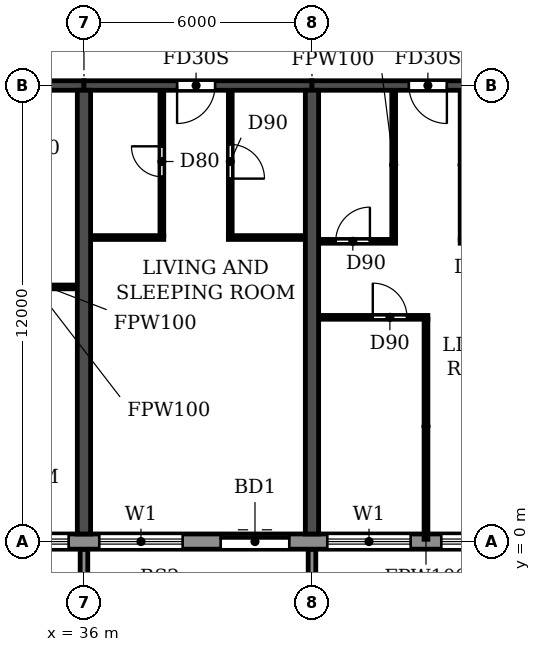
"""IFC4 building model, lengths in metres.
Left out: names, types, materials, properties, quantities, classifications, styles, units other than length and angle.
Written with IfcOpenShell. Run it as: python <this file> out.ifc"""

import sys

from ifc_helpers import new_model, si_unit, direction, frame, frame_2d, origin, place, context, subcontext, project, spatial, polyline, rectangle, outline, extrude, source, transform, mapped, element, fill, save


model = new_model("IFC4")
c1 = context("Model", 3, precision=1e-05, world=origin(), true_north=direction((0.0, 1.0)))
c2 = subcontext(c1, "Body", "Model", "MODEL_VIEW")
j1 = project(units=[si_unit("LENGTHUNIT", "METRE"), si_unit("PLANEANGLEUNIT", "RADIAN")], contexts=[c1])
p1 = place(None, origin())
s1 = spatial("IfcSite", under=j1, at=p1, CompositionType="ELEMENT")
p2 = place(p1, origin())
s2 = spatial("IfcBuilding", under=s1, at=p2, CompositionType="ELEMENT")
p3 = place(p2, frame((0.0, 0.0, 102.6)))
s3 = spatial("IfcBuildingStorey", under=s2, at=p3, CompositionType="ELEMENT", Elevation=102.6)
for number, where, z_axis, x_axis in (
    (1, (36.0, 0.2, 0.0), (0.0, 0.0, 1.0), (0.0, 1.0, 0.0)),
    (2, (42.0, 0.2, 0.0), (0.0, 0.0, 1.0), (0.0, 1.0, 0.0)),
):
    element("IfcWall", number, at=place(p3, frame(where, z_axis=z_axis, x_axis=x_axis)), inside=s3, PredefinedType="SHEAR", context=c2, shape_type="SweptSolid", body=[
        extrude(rectangle(XDim=11.675, YDim=0.35, at=frame_2d((5.837, 0.0))), origin(), (0.0, 0.0, 1.0), 3.0),
    ])
p4 = place(p3, frame((30.0, 12.0, 0.0), z_axis=(0.0, 0.0, 1.0), x_axis=(1.0, 0.0, 0.0)))
e3 = element("IfcWall", 3, at=p4, inside=s3, PredefinedType="SHEAR", context=c2, shape_type="SweptSolid", body=[
    extrude(rectangle(XDim=6.0, YDim=0.25, at=frame_2d((3.0, 0.0))), origin(), (0.0, 0.0, 1.0), 2.4),
])
p5 = place(p4, frame((2.45, 0.0, 0.0)))
e4 = element("IfcOpeningElement", 4, at=p5, cuts=e3, PredefinedType="OPENING", context=c2, shape_type="SweptSolid", body=[
    extrude(rectangle(XDim=1.0, YDim=2.1, at=frame_2d((0.5, 1.05))), frame((0.0, 0.135, 0.0), z_axis=(0.0, -1.0, 0.0), x_axis=(1.0, 0.0, 0.0)), (0.0, 0.0, 1.0), 0.27),
])
p6 = place(p3, frame((36.0, 12.0, 0.0), z_axis=(0.0, 0.0, 1.0), x_axis=(1.0, 0.0, 0.0)))
e5 = element("IfcWall", 5, at=p6, inside=s3, PredefinedType="SHEAR", context=c2, shape_type="SweptSolid", body=[
    extrude(rectangle(XDim=6.0, YDim=0.25, at=frame_2d((3.0, 0.0))), origin(), (0.0, 0.0, 1.0), 2.4),
])
p7 = place(p6, frame((2.45, 0.0, 0.0)))
e6 = element("IfcOpeningElement", 6, at=p7, cuts=e5, PredefinedType="OPENING", context=c2, shape_type="SweptSolid", body=[
    extrude(rectangle(XDim=1.0, YDim=2.1, at=frame_2d((0.5, 1.05))), frame((0.0, 0.135, 0.0), z_axis=(0.0, -1.0, 0.0), x_axis=(1.0, 0.0, 0.0)), (0.0, 0.0, 1.0), 0.27),
])
p8 = place(p3, frame((42.0, 12.0, 0.0), z_axis=(0.0, 0.0, 1.0), x_axis=(1.0, 0.0, 0.0)))
e7 = element("IfcWall", 7, at=p8, inside=s3, PredefinedType="SHEAR", context=c2, shape_type="SweptSolid", body=[
    extrude(rectangle(XDim=6.0, YDim=0.25, at=frame_2d((3.0, 0.0))), origin(), (0.0, 0.0, 1.0), 2.4),
])
p9 = place(p8, frame((2.55, 0.0, 0.0)))
e8 = element("IfcOpeningElement", 8, at=p9, cuts=e7, PredefinedType="OPENING", context=c2, shape_type="SweptSolid", body=[
    extrude(rectangle(XDim=1.0, YDim=2.1, at=frame_2d((0.5, 1.05))), frame((0.0, 0.135, 0.0), z_axis=(0.0, -1.0, 0.0), x_axis=(1.0, 0.0, 0.0)), (0.0, 0.0, 1.0), 0.27),
])
p10 = place(p3, frame((10.683, 0.0, 0.0), z_axis=(0.0, 0.0, 1.0), x_axis=(1.0, 0.0, 0.0)))
e9 = element("IfcWall", 9, at=p10, inside=s3, PredefinedType="STANDARD", context=c2, shape_type="SweptSolid", body=[
    extrude(rectangle(XDim=80.634, YDim=0.4, at=frame_2d((40.317, 0.0))), origin(), (0.0, 0.0, 1.0), 3.0),
])
p11 = place(p10, frame((1.717, 0.0, 0.9)))
e10 = element("IfcOpeningElement", 10, at=p11, cuts=e9, PredefinedType="OPENING", context=c2, shape_type="SweptSolid", body=[
    extrude(rectangle(XDim=2.2, YDim=1.5, at=frame_2d((1.1, 0.75))), frame((0.0, 0.21, 0.0), z_axis=(0.0, -1.0, 0.0), x_axis=(1.0, 0.0, 0.0)), (0.0, 0.0, 1.0), 0.42),
])
p12 = place(p10, frame((4.917, 0.0, 0.0)))
e11 = element("IfcOpeningElement", 11, at=p12, cuts=e9, PredefinedType="OPENING", context=c2, shape_type="SweptSolid", body=[
    extrude(rectangle(XDim=1.8, YDim=2.4, at=frame_2d((0.9, 1.2))), frame((0.0, 0.21, 0.0), z_axis=(0.0, -1.0, 0.0), x_axis=(1.0, 0.0, 0.0)), (0.0, 0.0, 1.0), 0.42),
])
p13 = place(p10, frame((7.717, 0.0, 0.9)))
e12 = element("IfcOpeningElement", 12, at=p13, cuts=e9, PredefinedType="OPENING", context=c2, shape_type="SweptSolid", body=[
    extrude(rectangle(XDim=2.2, YDim=1.5, at=frame_2d((1.1, 0.75))), frame((0.0, 0.21, 0.0), z_axis=(0.0, -1.0, 0.0), x_axis=(1.0, 0.0, 0.0)), (0.0, 0.0, 1.0), 0.42),
])
p14 = place(p10, frame((10.717, 0.0, 0.9)))
e13 = element("IfcOpeningElement", 13, at=p14, cuts=e9, PredefinedType="OPENING", context=c2, shape_type="SweptSolid", body=[
    extrude(rectangle(XDim=2.2, YDim=1.5, at=frame_2d((1.1, 0.75))), frame((0.0, 0.21, 0.0), z_axis=(0.0, -1.0, 0.0), x_axis=(1.0, 0.0, 0.0)), (0.0, 0.0, 1.0), 0.42),
])
p15 = place(p10, frame((13.717, 0.0, 0.9)))
e14 = element("IfcOpeningElement", 14, at=p15, cuts=e9, PredefinedType="OPENING", context=c2, shape_type="SweptSolid", body=[
    extrude(rectangle(XDim=2.2, YDim=1.5, at=frame_2d((1.1, 0.75))), frame((0.0, 0.21, 0.0), z_axis=(0.0, -1.0, 0.0), x_axis=(1.0, 0.0, 0.0)), (0.0, 0.0, 1.0), 0.42),
])
p16 = place(p10, frame((16.717, 0.0, 0.9)))
e15 = element("IfcOpeningElement", 15, at=p16, cuts=e9, PredefinedType="OPENING", context=c2, shape_type="SweptSolid", body=[
    extrude(rectangle(XDim=2.2, YDim=1.5, at=frame_2d((1.1, 0.75))), frame((0.0, 0.21, 0.0), z_axis=(0.0, -1.0, 0.0), x_axis=(1.0, 0.0, 0.0)), (0.0, 0.0, 1.0), 0.42),
])
p17 = place(p10, frame((19.717, 0.0, 0.9)))
e16 = element("IfcOpeningElement", 16, at=p17, cuts=e9, PredefinedType="OPENING", context=c2, shape_type="SweptSolid", body=[
    extrude(rectangle(XDim=2.2, YDim=1.5, at=frame_2d((1.1, 0.75))), frame((0.0, 0.21, 0.0), z_axis=(0.0, -1.0, 0.0), x_axis=(1.0, 0.0, 0.0)), (0.0, 0.0, 1.0), 0.42),
])
p18 = place(p10, frame((22.717, 0.0, 0.9)))
e17 = element("IfcOpeningElement", 17, at=p18, cuts=e9, PredefinedType="OPENING", context=c2, shape_type="SweptSolid", body=[
    extrude(rectangle(XDim=2.2, YDim=1.5, at=frame_2d((1.1, 0.75))), frame((0.0, 0.21, 0.0), z_axis=(0.0, -1.0, 0.0), x_axis=(1.0, 0.0, 0.0)), (0.0, 0.0, 1.0), 0.42),
])
p19 = place(p10, frame((25.717, 0.0, 0.9)))
e18 = element("IfcOpeningElement", 18, at=p19, cuts=e9, PredefinedType="OPENING", context=c2, shape_type="SweptSolid", body=[
    extrude(rectangle(XDim=2.2, YDim=1.5, at=frame_2d((1.1, 0.75))), frame((0.0, 0.21, 0.0), z_axis=(0.0, -1.0, 0.0), x_axis=(1.0, 0.0, 0.0)), (0.0, 0.0, 1.0), 0.42),
])
p20 = place(p10, frame((28.917, 0.0, 0.0)))
e19 = element("IfcOpeningElement", 19, at=p20, cuts=e9, PredefinedType="OPENING", context=c2, shape_type="SweptSolid", body=[
    extrude(rectangle(XDim=1.8, YDim=2.4, at=frame_2d((0.9, 1.2))), frame((0.0, 0.21, 0.0), z_axis=(0.0, -1.0, 0.0), x_axis=(1.0, 0.0, 0.0)), (0.0, 0.0, 1.0), 0.42),
])
p21 = place(p10, frame((31.717, 0.0, 0.9)))
e20 = element("IfcOpeningElement", 20, at=p21, cuts=e9, PredefinedType="OPENING", context=c2, shape_type="SweptSolid", body=[
    extrude(rectangle(XDim=2.2, YDim=1.5, at=frame_2d((1.1, 0.75))), frame((0.0, 0.21, 0.0), z_axis=(0.0, -1.0, 0.0), x_axis=(1.0, 0.0, 0.0)), (0.0, 0.0, 1.0), 0.42),
])
p22 = place(p10, frame((34.717, 0.0, 0.9)))
e21 = element("IfcOpeningElement", 21, at=p22, cuts=e9, PredefinedType="OPENING", context=c2, shape_type="SweptSolid", body=[
    extrude(rectangle(XDim=2.2, YDim=1.5, at=frame_2d((1.1, 0.75))), frame((0.0, 0.21, 0.0), z_axis=(0.0, -1.0, 0.0), x_axis=(1.0, 0.0, 0.0)), (0.0, 0.0, 1.0), 0.42),
])
p23 = place(p10, frame((37.717, 0.0, 0.9)))
e22 = element("IfcOpeningElement", 22, at=p23, cuts=e9, PredefinedType="OPENING", context=c2, shape_type="SweptSolid", body=[
    extrude(rectangle(XDim=2.2, YDim=1.5, at=frame_2d((1.1, 0.75))), frame((0.0, 0.21, 0.0), z_axis=(0.0, -1.0, 0.0), x_axis=(1.0, 0.0, 0.0)), (0.0, 0.0, 1.0), 0.42),
])
p24 = place(p10, frame((40.717, 0.0, 0.9)))
e23 = element("IfcOpeningElement", 23, at=p24, cuts=e9, PredefinedType="OPENING", context=c2, shape_type="SweptSolid", body=[
    extrude(rectangle(XDim=2.2, YDim=1.5, at=frame_2d((1.1, 0.75))), frame((0.0, 0.21, 0.0), z_axis=(0.0, -1.0, 0.0), x_axis=(1.0, 0.0, 0.0)), (0.0, 0.0, 1.0), 0.42),
])
p25 = place(p10, frame((43.717, 0.0, 0.9)))
e24 = element("IfcOpeningElement", 24, at=p25, cuts=e9, PredefinedType="OPENING", context=c2, shape_type="SweptSolid", body=[
    extrude(rectangle(XDim=2.2, YDim=1.5, at=frame_2d((1.1, 0.75))), frame((0.0, 0.21, 0.0), z_axis=(0.0, -1.0, 0.0), x_axis=(1.0, 0.0, 0.0)), (0.0, 0.0, 1.0), 0.42),
])
p26 = place(p10, frame((46.717, 0.0, 0.9)))
e25 = element("IfcOpeningElement", 25, at=p26, cuts=e9, PredefinedType="OPENING", context=c2, shape_type="SweptSolid", body=[
    extrude(rectangle(XDim=2.2, YDim=1.5, at=frame_2d((1.1, 0.75))), frame((0.0, 0.21, 0.0), z_axis=(0.0, -1.0, 0.0), x_axis=(1.0, 0.0, 0.0)), (0.0, 0.0, 1.0), 0.42),
])
p27 = place(p10, frame((49.917, 0.0, 0.0)))
e26 = element("IfcOpeningElement", 26, at=p27, cuts=e9, PredefinedType="OPENING", context=c2, shape_type="SweptSolid", body=[
    extrude(rectangle(XDim=1.8, YDim=2.4, at=frame_2d((0.9, 1.2))), frame((0.0, 0.21, 0.0), z_axis=(0.0, -1.0, 0.0), x_axis=(1.0, 0.0, 0.0)), (0.0, 0.0, 1.0), 0.42),
])
p28 = place(p10, frame((52.717, 0.0, 0.9)))
e27 = element("IfcOpeningElement", 27, at=p28, cuts=e9, PredefinedType="OPENING", context=c2, shape_type="SweptSolid", body=[
    extrude(rectangle(XDim=2.2, YDim=1.5, at=frame_2d((1.1, 0.75))), frame((0.0, 0.21, 0.0), z_axis=(0.0, -1.0, 0.0), x_axis=(1.0, 0.0, 0.0)), (0.0, 0.0, 1.0), 0.42),
])
p29 = place(p10, frame((55.717, 0.0, 0.9)))
e28 = element("IfcOpeningElement", 28, at=p29, cuts=e9, PredefinedType="OPENING", context=c2, shape_type="SweptSolid", body=[
    extrude(rectangle(XDim=2.2, YDim=1.5, at=frame_2d((1.1, 0.75))), frame((0.0, 0.21, 0.0), z_axis=(0.0, -1.0, 0.0), x_axis=(1.0, 0.0, 0.0)), (0.0, 0.0, 1.0), 0.42),
])
p30 = place(p10, frame((58.717, 0.0, 0.9)))
e29 = element("IfcOpeningElement", 29, at=p30, cuts=e9, PredefinedType="OPENING", context=c2, shape_type="SweptSolid", body=[
    extrude(rectangle(XDim=2.2, YDim=1.5, at=frame_2d((1.1, 0.75))), frame((0.0, 0.21, 0.0), z_axis=(0.0, -1.0, 0.0), x_axis=(1.0, 0.0, 0.0)), (0.0, 0.0, 1.0), 0.42),
])
p31 = place(p10, frame((61.717, 0.0, 0.9)))
e30 = element("IfcOpeningElement", 30, at=p31, cuts=e9, PredefinedType="OPENING", context=c2, shape_type="SweptSolid", body=[
    extrude(rectangle(XDim=2.2, YDim=1.5, at=frame_2d((1.1, 0.75))), frame((0.0, 0.21, 0.0), z_axis=(0.0, -1.0, 0.0), x_axis=(1.0, 0.0, 0.0)), (0.0, 0.0, 1.0), 0.42),
])
p32 = place(p10, frame((64.717, 0.0, 0.9)))
e31 = element("IfcOpeningElement", 31, at=p32, cuts=e9, PredefinedType="OPENING", context=c2, shape_type="SweptSolid", body=[
    extrude(rectangle(XDim=2.2, YDim=1.5, at=frame_2d((1.1, 0.75))), frame((0.0, 0.21, 0.0), z_axis=(0.0, -1.0, 0.0), x_axis=(1.0, 0.0, 0.0)), (0.0, 0.0, 1.0), 0.42),
])
p33 = place(p10, frame((67.717, 0.0, 0.9)))
e32 = element("IfcOpeningElement", 32, at=p33, cuts=e9, PredefinedType="OPENING", context=c2, shape_type="SweptSolid", body=[
    extrude(rectangle(XDim=2.2, YDim=1.5, at=frame_2d((1.1, 0.75))), frame((0.0, 0.21, 0.0), z_axis=(0.0, -1.0, 0.0), x_axis=(1.0, 0.0, 0.0)), (0.0, 0.0, 1.0), 0.42),
])
p34 = place(p10, frame((70.717, 0.0, 0.9)))
e33 = element("IfcOpeningElement", 33, at=p34, cuts=e9, PredefinedType="OPENING", context=c2, shape_type="SweptSolid", body=[
    extrude(rectangle(XDim=2.2, YDim=1.5, at=frame_2d((1.1, 0.75))), frame((0.0, 0.21, 0.0), z_axis=(0.0, -1.0, 0.0), x_axis=(1.0, 0.0, 0.0)), (0.0, 0.0, 1.0), 0.42),
])
p35 = place(p10, frame((73.717, 0.0, 0.9)))
e34 = element("IfcOpeningElement", 34, at=p35, cuts=e9, PredefinedType="OPENING", context=c2, shape_type="SweptSolid", body=[
    extrude(rectangle(XDim=2.2, YDim=1.5, at=frame_2d((1.1, 0.75))), frame((0.0, 0.21, 0.0), z_axis=(0.0, -1.0, 0.0), x_axis=(1.0, 0.0, 0.0)), (0.0, 0.0, 1.0), 0.42),
])
p36 = place(p10, frame((76.917, 0.0, 0.0)))
e35 = element("IfcOpeningElement", 35, at=p36, cuts=e9, PredefinedType="OPENING", context=c2, shape_type="SweptSolid", body=[
    extrude(rectangle(XDim=1.8, YDim=2.4, at=frame_2d((0.9, 1.2))), frame((0.0, 0.21, 0.0), z_axis=(0.0, -1.0, 0.0), x_axis=(1.0, 0.0, 0.0)), (0.0, 0.0, 1.0), 0.42),
])
m1 = source(origin(), c2, "Body", "SweptSolid", [
    extrude(outline(polyline([(0.0, 0.0), (0.2, 0.0), (0.2, 1.65), (0.0, 1.65), (0.0, 0.0)])), origin(), (0.0, 0.0, 1.0), 3.1),
])
for number, where in (
    (36, (35.9, -1.85, 0.0)),
    (37, (41.9, -1.85, 0.0)),
):
    element("IfcWall", number, at=place(p3, frame(where)), inside=s3, PredefinedType="STANDARD", context=c2, shape_type="MappedRepresentation", body=[
        mapped(m1, transform((0.0, 0.0, 0.0))),
    ])
p37 = place(p3, frame((42.185, 5.9, 0.0), z_axis=(0.0, 0.0, 1.0), x_axis=(1.0, 0.0, 0.0)))
e38 = element("IfcWall", 38, at=p37, inside=s3, PredefinedType="PARTITIONING", context=c2, shape_type="SweptSolid", body=[
    extrude(rectangle(XDim=2.865, YDim=0.1, at=frame_2d((1.433, 0.0))), origin(), (0.0, 0.0, 1.0), 3.0),
])
p38 = place(p37, frame((1.415, 0.0, 0.0)))
e39 = element("IfcOpeningElement", 39, at=p38, cuts=e38, PredefinedType="OPENING", context=c2, shape_type="SweptSolid", body=[
    extrude(rectangle(XDim=0.9, YDim=2.1, at=frame_2d((0.45, 1.05))), frame((0.0, 0.06, 0.0), z_axis=(0.0, -1.0, 0.0), x_axis=(1.0, 0.0, 0.0)), (0.0, 0.0, 1.0), 0.12),
])
p39 = place(p3, frame((33.8, 6.7, 0.0), z_axis=(0.0, 0.0, 1.0), x_axis=(1.0, 0.0, 0.0)))
e40 = element("IfcWall", 40, at=p39, inside=s3, PredefinedType="PARTITIONING", context=c2, shape_type="SweptSolid", body=[
    extrude(rectangle(XDim=2.015, YDim=0.1, at=frame_2d((1.007, 0.0))), origin(), (0.0, 0.0, 1.0), 3.0),
])
p40 = place(p3, frame((42.185, 7.9, 0.0), z_axis=(0.0, 0.0, 1.0), x_axis=(1.0, 0.0, 0.0)))
e41 = element("IfcWall", 41, at=p40, inside=s3, PredefinedType="PARTITIONING", context=c2, shape_type="SweptSolid", body=[
    extrude(rectangle(XDim=2.015, YDim=0.1, at=frame_2d((1.007, 0.0))), origin(), (0.0, 0.0, 1.0), 3.0),
])
p41 = place(p40, frame((0.44, 0.0, 0.0)))
e42 = element("IfcOpeningElement", 42, at=p41, cuts=e41, PredefinedType="OPENING", context=c2, shape_type="SweptSolid", body=[
    extrude(rectangle(XDim=0.9, YDim=2.1, at=frame_2d((0.45, 1.05))), frame((0.0, 0.06, 0.0), z_axis=(0.0, -1.0, 0.0), x_axis=(1.0, 0.0, 0.0)), (0.0, 0.0, 1.0), 0.12),
])
p42 = place(p3, frame((45.9, 7.9, 0.0), z_axis=(0.0, 0.0, 1.0), x_axis=(1.0, 0.0, 0.0)))
e43 = element("IfcWall", 43, at=p42, inside=s3, PredefinedType="PARTITIONING", context=c2, shape_type="SweptSolid", body=[
    extrude(rectangle(XDim=1.915, YDim=0.1, at=frame_2d((0.958, 0.0))), origin(), (0.0, 0.0, 1.0), 3.0),
])
p43 = place(p42, frame((0.675, 0.0, 0.0)))
e44 = element("IfcOpeningElement", 44, at=p43, cuts=e43, PredefinedType="OPENING", context=c2, shape_type="SweptSolid", body=[
    extrude(rectangle(XDim=0.8, YDim=2.1, at=frame_2d((0.4, 1.05))), frame((0.0, 0.06, 0.0), z_axis=(0.0, -1.0, 0.0), x_axis=(1.0, 0.0, 0.0)), (0.0, 0.0, 1.0), 0.12),
])
p44 = place(p3, frame((36.185, 8.0, 0.0), z_axis=(0.0, 0.0, 1.0), x_axis=(1.0, 0.0, 0.0)))
e45 = element("IfcWall", 45, at=p44, inside=s3, PredefinedType="PARTITIONING", context=c2, shape_type="SweptSolid", body=[
    extrude(rectangle(XDim=1.915, YDim=0.1, at=frame_2d((0.958, 0.0))), origin(), (0.0, 0.0, 1.0), 3.0),
])
p45 = place(p3, frame((39.8, 8.0, 0.0), z_axis=(0.0, 0.0, 1.0), x_axis=(1.0, 0.0, 0.0)))
e46 = element("IfcWall", 46, at=p45, inside=s3, PredefinedType="PARTITIONING", context=c2, shape_type="SweptSolid", body=[
    extrude(rectangle(XDim=2.015, YDim=0.1, at=frame_2d((1.007, 0.0))), origin(), (0.0, 0.0, 1.0), 3.0),
])
p46 = place(p3, frame((38.05, 8.05, 0.0), z_axis=(0.0, 0.0, 1.0), x_axis=(0.0, 1.0, 0.0)))
e47 = element("IfcWall", 47, at=p46, inside=s3, PredefinedType="PARTITIONING", context=c2, shape_type="SweptSolid", body=[
    extrude(rectangle(XDim=3.815, YDim=0.1, at=frame_2d((1.907, 0.0))), origin(), (0.0, 0.0, 1.0), 3.0),
])
p47 = place(p46, frame((1.55, 0.0, 0.0)))
e48 = element("IfcOpeningElement", 48, at=p47, cuts=e47, PredefinedType="OPENING", context=c2, shape_type="SweptSolid", body=[
    extrude(rectangle(XDim=0.8, YDim=2.1, at=frame_2d((0.4, 1.05))), frame((0.0, 0.06, 0.0), z_axis=(0.0, -1.0, 0.0), x_axis=(1.0, 0.0, 0.0)), (0.0, 0.0, 1.0), 0.12),
])
p48 = place(p3, frame((39.85, 8.05, 0.0), z_axis=(0.0, 0.0, 1.0), x_axis=(0.0, 1.0, 0.0)))
e49 = element("IfcWall", 49, at=p48, inside=s3, PredefinedType="PARTITIONING", context=c2, shape_type="SweptSolid", body=[
    extrude(rectangle(XDim=3.815, YDim=0.1, at=frame_2d((1.907, 0.0))), origin(), (0.0, 0.0, 1.0), 3.0),
])
p49 = place(p48, frame((1.5, 0.0, 0.0)))
e50 = element("IfcOpeningElement", 50, at=p49, cuts=e49, PredefinedType="OPENING", context=c2, shape_type="SweptSolid", body=[
    extrude(rectangle(XDim=0.9, YDim=2.1, at=frame_2d((0.45, 1.05))), frame((0.0, 0.06, 0.0), z_axis=(0.0, -1.0, 0.0), x_axis=(1.0, 0.0, 0.0)), (0.0, 0.0, 1.0), 0.12),
])
p50 = place(p3, frame((44.15, 7.95, 0.0), z_axis=(0.0, 0.0, 1.0), x_axis=(0.0, 1.0, 0.0)))
e51 = element("IfcWall", 51, at=p50, inside=s3, PredefinedType="PARTITIONING", context=c2, shape_type="SweptSolid", body=[
    extrude(rectangle(XDim=3.915, YDim=0.1, at=frame_2d((1.958, 0.0))), origin(), (0.0, 0.0, 1.0), 3.0),
])
p51 = place(p3, frame((45.0, 0.06, 0.0), z_axis=(0.0, 0.0, 1.0), x_axis=(0.0, 1.0, 0.0)))
e52 = element("IfcWall", 52, at=p51, inside=s3, PredefinedType="PARTITIONING", context=c2, shape_type="SweptSolid", body=[
    extrude(rectangle(XDim=5.79, YDim=0.1, at=frame_2d((2.895, 0.0))), origin(), (0.0, 0.0, 1.0), 3.0),
])
p52 = place(p3, frame((45.95, 7.95, 0.0), z_axis=(0.0, 0.0, 1.0), x_axis=(0.0, 1.0, 0.0)))
e53 = element("IfcWall", 53, at=p52, inside=s3, PredefinedType="PARTITIONING", context=c2, shape_type="SweptSolid", body=[
    extrude(rectangle(XDim=3.915, YDim=0.1, at=frame_2d((1.958, 0.0))), origin(), (0.0, 0.0, 1.0), 3.0),
])
p53 = place(p18, origin())
e54 = element("IfcWindow", 54, at=p53, inside=s3, PartitioningType="DOUBLE_PANEL_HORIZONTAL", PredefinedType="WINDOW", context=c2, shape_type="SweptSolid", body=[
    extrude(rectangle(XDim=2.2, YDim=1.5, at=frame_2d((1.1, 0.75))), frame((0.0, 0.03, 0.0), z_axis=(0.0, -1.0, 0.0), x_axis=(1.0, 0.0, 0.0)), (0.0, 0.0, 1.0), 0.06),
])
fill(e17, e54)
p54 = place(p19, origin())
e55 = element("IfcWindow", 55, at=p54, inside=s3, PartitioningType="DOUBLE_PANEL_HORIZONTAL", PredefinedType="WINDOW", context=c2, shape_type="SweptSolid", body=[
    extrude(rectangle(XDim=2.2, YDim=1.5, at=frame_2d((1.1, 0.75))), frame((0.0, 0.03, 0.0), z_axis=(0.0, -1.0, 0.0), x_axis=(1.0, 0.0, 0.0)), (0.0, 0.0, 1.0), 0.06),
])
fill(e18, e55)
p55 = place(p20, origin())
e56 = element("IfcDoor", 56, at=p55, inside=s3, OperationType="DOUBLE_DOOR_SLIDING", PredefinedType="DOOR", context=c2, shape_type="SweptSolid", body=[
    extrude(rectangle(XDim=1.8, YDim=2.4, at=frame_2d((0.9, 1.2))), frame((0.0, 0.025, 0.0), z_axis=(0.0, -1.0, 0.0), x_axis=(1.0, 0.0, 0.0)), (0.0, 0.0, 1.0), 0.05),
])
fill(e19, e56)
p56 = place(p21, origin())
e57 = element("IfcWindow", 57, at=p56, inside=s3, PartitioningType="DOUBLE_PANEL_HORIZONTAL", PredefinedType="WINDOW", context=c2, shape_type="SweptSolid", body=[
    extrude(rectangle(XDim=2.2, YDim=1.5, at=frame_2d((1.1, 0.75))), frame((0.0, 0.03, 0.0), z_axis=(0.0, -1.0, 0.0), x_axis=(1.0, 0.0, 0.0)), (0.0, 0.0, 1.0), 0.06),
])
fill(e20, e57)
p57 = place(p22, origin())
e58 = element("IfcWindow", 58, at=p57, inside=s3, PartitioningType="DOUBLE_PANEL_HORIZONTAL", PredefinedType="WINDOW", context=c2, shape_type="SweptSolid", body=[
    extrude(rectangle(XDim=2.2, YDim=1.5, at=frame_2d((1.1, 0.75))), frame((0.0, 0.03, 0.0), z_axis=(0.0, -1.0, 0.0), x_axis=(1.0, 0.0, 0.0)), (0.0, 0.0, 1.0), 0.06),
])
fill(e21, e58)
p58 = place(p47, origin())
e59 = element("IfcDoor", 59, at=p58, inside=s3, OperationType="SINGLE_SWING_RIGHT", PredefinedType="DOOR", context=c2, shape_type="SweptSolid", body=[
    extrude(rectangle(XDim=0.8, YDim=2.1, at=frame_2d((0.4, 1.05))), frame((0.0, 0.025, 0.0), z_axis=(0.0, -1.0, 0.0), x_axis=(1.0, 0.0, 0.0)), (0.0, 0.0, 1.0), 0.05),
])
fill(e48, e59)
p59 = place(p7, frame((1.0, 0.0, 0.0), z_axis=(0.0, 0.0, 1.0), x_axis=(-1.0, 0.0, 0.0)))
e60 = element("IfcDoor", 60, at=p59, inside=s3, OperationType="SINGLE_SWING_RIGHT", PredefinedType="DOOR", context=c2, shape_type="SweptSolid", body=[
    extrude(rectangle(XDim=1.0, YDim=2.1, at=frame_2d((0.5, 1.05))), frame((0.0, 0.025, 0.0), z_axis=(0.0, -1.0, 0.0), x_axis=(1.0, 0.0, 0.0)), (0.0, 0.0, 1.0), 0.05),
])
fill(e6, e60)
p60 = place(p49, frame((0.9, 0.0, 0.0), z_axis=(0.0, 0.0, 1.0), x_axis=(-1.0, 0.0, 0.0)))
e61 = element("IfcDoor", 61, at=p60, inside=s3, OperationType="SINGLE_SWING_RIGHT", PredefinedType="DOOR", context=c2, shape_type="SweptSolid", body=[
    extrude(rectangle(XDim=0.9, YDim=2.1, at=frame_2d((0.45, 1.05))), frame((0.0, 0.025, 0.0), z_axis=(0.0, -1.0, 0.0), x_axis=(1.0, 0.0, 0.0)), (0.0, 0.0, 1.0), 0.05),
])
fill(e50, e61)
p61 = place(p41, origin())
e62 = element("IfcDoor", 62, at=p61, inside=s3, OperationType="SINGLE_SWING_RIGHT", PredefinedType="DOOR", context=c2, shape_type="SweptSolid", body=[
    extrude(rectangle(XDim=0.9, YDim=2.1, at=frame_2d((0.45, 1.05))), frame((0.0, 0.025, 0.0), z_axis=(0.0, -1.0, 0.0), x_axis=(1.0, 0.0, 0.0)), (0.0, 0.0, 1.0), 0.05),
])
fill(e42, e62)
p62 = place(p38, origin())
e63 = element("IfcDoor", 63, at=p62, inside=s3, OperationType="SINGLE_SWING_LEFT", PredefinedType="DOOR", context=c2, shape_type="SweptSolid", body=[
    extrude(rectangle(XDim=0.9, YDim=2.1, at=frame_2d((0.45, 1.05))), frame((0.0, 0.025, 0.0), z_axis=(0.0, -1.0, 0.0), x_axis=(1.0, 0.0, 0.0)), (0.0, 0.0, 1.0), 0.05),
])
fill(e39, e63)
p63 = place(p9, frame((1.0, 0.0, 0.0), z_axis=(0.0, 0.0, 1.0), x_axis=(-1.0, 0.0, 0.0)))
e64 = element("IfcDoor", 64, at=p63, inside=s3, OperationType="SINGLE_SWING_LEFT", PredefinedType="DOOR", context=c2, shape_type="SweptSolid", body=[
    extrude(rectangle(XDim=1.0, YDim=2.1, at=frame_2d((0.5, 1.05))), frame((0.0, 0.025, 0.0), z_axis=(0.0, -1.0, 0.0), x_axis=(1.0, 0.0, 0.0)), (0.0, 0.0, 1.0), 0.05),
])
fill(e8, e64)
save(model, sys.argv[1])
